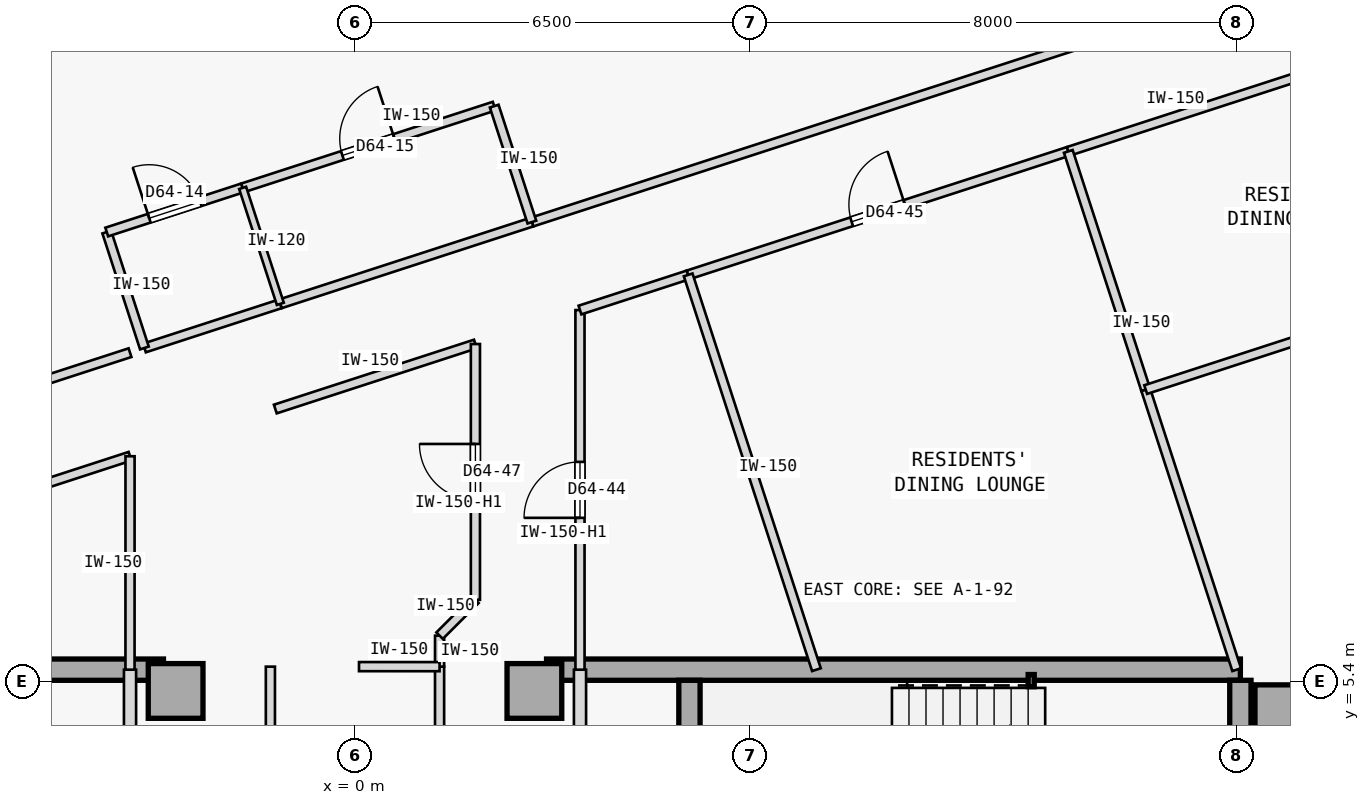
"""IFC4 building model, lengths in metres.
Left out: names, types, materials, properties, quantities, classifications, styles, units other than length and angle.
Written with IfcOpenShell. Run it as: python <this file> out.ifc"""

import sys

from ifc_helpers import new_model, si_unit, direction, frame, frame_2d, origin, origin_2d, place, context, subcontext, project, spatial, rectangle, hollow_rectangle, extrude, element, fill, save


model = new_model("IFC4")
c1 = context("Model", 3, precision=1e-05, world=origin(), true_north=direction((0.0, 1.0)))
c2 = subcontext(c1, "Body", "Model", "MODEL_VIEW")
j1 = project(units=[si_unit("LENGTHUNIT", "METRE"), si_unit("PLANEANGLEUNIT", "RADIAN")], contexts=[c1])
p1 = place(None, origin())
s1 = spatial("IfcSite", under=j1, at=p1, CompositionType="ELEMENT")
p2 = place(p1, origin())
s2 = spatial("IfcBuilding", under=s1, at=p2, CompositionType="ELEMENT")
p3 = place(p2, frame((0.0, 0.0, 241.05)))
s3 = spatial("IfcBuildingStorey", under=s2, at=p3, CompositionType="ELEMENT", Elevation=241.05)
for number, where, z_axis, x_axis in (
    (1, (-2.95, 5.25, 0.0), (0.0, 0.0, 1.0), (1.0, 0.0, 0.0)),
    (2, (15.25, 4.9, 0.0), (0.0, 0.0, 1.0), (1.0, 0.0, 0.0)),
    (3, (2.95, 5.25, 0.0), (0.0, 0.0, 1.0), (1.0, 0.0, 0.0)),
):
    element("IfcColumn", number, at=place(p3, frame(where, z_axis=z_axis, x_axis=x_axis)), inside=s3, PredefinedType="COLUMN", context=c2, shape_type="SweptSolid", body=[
        extrude(rectangle(XDim=0.9, YDim=0.9, at=origin_2d()), origin(), (0.0, 0.0, 1.0), 3.35),
    ])
for number, where, z_axis, x_axis in (
    (4, (-14.56, 5.6, 0.0), (0.0, 0.0, 1.0), (1.0, 0.0, 0.0)),
    (5, (3.15, 5.6, 0.0), (0.0, 0.0, 1.0), (1.0, 0.0, 0.0)),
):
    element("IfcWall", number, at=place(p3, frame(where, z_axis=z_axis, x_axis=x_axis)), inside=s3, PredefinedType="SHEAR", context=c2, shape_type="SweptSolid", body=[
        extrude(rectangle(XDim=11.41, YDim=0.35, at=frame_2d((5.705, 0.0))), origin(), (0.0, 0.0, 1.0), 3.125),
    ])
p4 = place(p3, frame((14.56, -5.425, 0.0), z_axis=(0.0, 0.0, 1.0), x_axis=(0.0, 1.0, 0.0)))
e6 = element("IfcWall", 6, at=p4, inside=s3, PredefinedType="SHEAR", context=c2, shape_type="SweptSolid", body=[
    extrude(rectangle(XDim=10.85, YDim=0.35, at=frame_2d((5.425, 0.0))), origin(), (0.0, 0.0, 1.0), 3.125),
])
p5 = place(p3, frame((5.5, 2.15, 0.0), z_axis=(0.0, 0.0, 1.0), x_axis=(0.0, 1.0, 0.0)))
e7 = element("IfcWall", 7, at=p5, inside=s3, PredefinedType="SHEAR", context=c2, shape_type="SweptSolid", body=[
    extrude(rectangle(XDim=3.275, YDim=0.35, at=frame_2d((1.638, 0.0))), origin(), (0.0, 0.0, 1.0), 3.125),
])
p6 = place(p3, frame((11.12, 5.42, 0.0), z_axis=(0.0, 0.0, 1.0), x_axis=(1.0, 0.0, 0.0)))
e8 = element("IfcColumn", 8, at=p6, inside=s3, PredefinedType="COLUMN", context=c2, shape_type="SweptSolid", body=[
    extrude(hollow_rectangle(XDim=0.1, YDim=0.2, WallThickness=0.008, at=origin_2d()), origin(), (0.0, 0.0, 1.0), 3.35),
])
p7 = place(p3, frame((-3.7, -1.15, 0.0), z_axis=(0.0, 0.0, 1.0), x_axis=(0.0, 1.0, 0.0)))
e9 = element("IfcWall", 9, at=p7, inside=s3, PredefinedType="STANDARD", context=c2, shape_type="SweptSolid", body=[
    extrude(rectangle(XDim=6.75, YDim=0.2, at=frame_2d((3.375, 0.0))), origin(), (0.0, 0.0, 1.0), 3.125),
])
p8 = place(p7, frame((3.6, 0.0, 0.0)))
e10 = element("IfcOpeningElement", 10, at=p8, cuts=e9, PredefinedType="OPENING", context=c2, shape_type="SweptSolid", body=[
    extrude(rectangle(XDim=0.92, YDim=2.15, at=frame_2d((0.46, 1.075))), frame((0.0, 0.11, 0.0), z_axis=(0.0, -1.0, 0.0), x_axis=(1.0, 0.0, 0.0)), (0.0, 0.0, 1.0), 0.22),
])
p9 = place(p3, frame((3.7, -1.15, 0.0), z_axis=(0.0, 0.0, 1.0), x_axis=(0.0, 1.0, 0.0)))
e11 = element("IfcWall", 11, at=p9, inside=s3, PredefinedType="STANDARD", context=c2, shape_type="SweptSolid", body=[
    extrude(rectangle(XDim=6.75, YDim=0.2, at=frame_2d((3.375, 0.0))), origin(), (0.0, 0.0, 1.0), 3.125),
])
p10 = place(p9, frame((1.1, 0.0, 0.0)))
e12 = element("IfcOpeningElement", 12, at=p10, cuts=e11, PredefinedType="OPENING", context=c2, shape_type="SweptSolid", body=[
    extrude(rectangle(XDim=0.9, YDim=2.15, at=frame_2d((0.45, 1.075))), frame((0.0, 0.11, 0.0), z_axis=(0.0, -1.0, 0.0), x_axis=(1.0, 0.0, 0.0)), (0.0, 0.0, 1.0), 0.22),
])
p11 = place(p9, frame((4.0, 0.0, 0.0)))
e13 = element("IfcOpeningElement", 13, at=p11, cuts=e11, PredefinedType="OPENING", context=c2, shape_type="SweptSolid", body=[
    extrude(rectangle(XDim=0.92, YDim=2.15, at=frame_2d((0.46, 1.075))), frame((0.0, 0.11, 0.0), z_axis=(0.0, -1.0, 0.0), x_axis=(1.0, 0.0, 0.0)), (0.0, 0.0, 1.0), 0.22),
])
p12 = place(p3, frame((-1.391, -5.65, 0.0), z_axis=(0.0, 0.0, 1.0), x_axis=(-8.6422954e-05, 0.999999996266, 0.0)))
e14 = element("IfcWall", 14, at=p12, inside=s3, PredefinedType="PARTITIONING", context=c2, shape_type="SweptSolid", body=[
    extrude(rectangle(XDim=11.3, YDim=0.15, at=frame_2d((5.65, 0.0))), origin(), (0.0, 0.0, 1.0), 3.125),
])
p13 = place(p12, frame((5.175, 0.0, 0.0)))
e15 = element("IfcOpeningElement", 15, at=p13, cuts=e14, PredefinedType="OPENING", context=c2, shape_type="SweptSolid", body=[
    extrude(rectangle(XDim=0.95, YDim=2.15, at=frame_2d((0.475, 1.075))), frame((0.0, 0.085, 0.0), z_axis=(0.0, -1.0, 0.0), x_axis=(1.0, 0.0, 0.0)), (0.0, 0.0, 1.0), 0.17),
])
p14 = place(p3, frame((1.391, -5.648, 0.0), z_axis=(0.0, 0.0, 1.0), x_axis=(-4.3218947e-05, 0.999999999066, 0.0)))
e16 = element("IfcWall", 16, at=p14, inside=s3, PredefinedType="PARTITIONING", context=c2, shape_type="SweptSolid", body=[
    extrude(rectangle(XDim=11.298, YDim=0.15, at=frame_2d((5.649, 0.0))), origin(), (0.0, 0.0, 1.0), 3.125),
])
p15 = place(p3, frame((-10.882, 8.479, 0.0), z_axis=(0.0, 0.0, 1.0), x_axis=(0.951051887333, 0.309031240494, 0.0)))
e17 = element("IfcWall", 17, at=p15, inside=s3, PredefinedType="PARTITIONING", context=c2, shape_type="SweptSolid", body=[
    extrude(rectangle(XDim=7.551, YDim=0.15, at=frame_2d((3.775, 0.0))), origin(), (0.0, 0.0, 1.0), 3.125),
])
p16 = place(p3, frame((2.909, 12.96, 0.0), z_axis=(0.0, 0.0, 1.0), x_axis=(0.951056113966, 0.309018232614, 0.0)))
e18 = element("IfcWall", 18, at=p16, inside=s3, PredefinedType="PARTITIONING", context=c2, shape_type="SweptSolid", body=[
    extrude(rectangle(XDim=21.076, YDim=0.15, at=frame_2d((10.538, 0.0))), origin(), (0.0, 0.0, 1.0), 3.125),
])
p17 = place(p16, frame((10.063, 0.0, 0.0)))
e19 = element("IfcOpeningElement", 19, at=p17, cuts=e18, PredefinedType="OPENING", context=c2, shape_type="SweptSolid", body=[
    extrude(rectangle(XDim=0.95, YDim=2.15, at=frame_2d((0.475, 1.075))), frame((0.0, 0.085, 0.0), z_axis=(0.0, -1.0, 0.0), x_axis=(1.0, 0.0, 0.0)), (0.0, 0.0, 1.0), 0.17),
])
p18 = place(p3, frame((-3.463, 10.89, 0.0), z_axis=(0.0, 0.0, 1.0), x_axis=(0.951045519245, 0.309050837767, 0.0)))
e20 = element("IfcWall", 20, at=p18, inside=s3, PredefinedType="PARTITIONING", context=c2, shape_type="SweptSolid", body=[
    extrude(rectangle(XDim=2.35, YDim=0.15, at=frame_2d((1.175, 0.0))), origin(), (0.0, 0.0, 1.0), 3.125),
])
p19 = place(p3, frame((-1.228, 11.616, 0.0), z_axis=(0.0, 0.0, 1.0), x_axis=(0.951069122051, 0.308978195154, 0.0)))
e21 = element("IfcWall", 21, at=p19, inside=s3, PredefinedType="PARTITIONING", context=c2, shape_type="SweptSolid", body=[
    extrude(rectangle(XDim=4.35, YDim=0.15, at=frame_2d((2.175, 0.0))), origin(), (0.0, 0.0, 1.0), 3.125),
])
p20 = place(p3, frame((3.7, 5.6, 0.0), z_axis=(0.0, 0.0, 1.0), x_axis=(-0.000123839008, 0.999999992332, 0.0)))
e22 = element("IfcWall", 22, at=p20, inside=s3, PredefinedType="PARTITIONING", context=c2, shape_type="SweptSolid", body=[
    extrude(rectangle(XDim=5.914, YDim=0.15, at=frame_2d((2.957, 0.0))), origin(), (0.0, 0.0, 1.0), 2.675),
])
p21 = place(p20, frame((2.497, 0.0, 0.0)))
e23 = element("IfcOpeningElement", 23, at=p21, cuts=e22, PredefinedType="OPENING", context=c2, shape_type="SweptSolid", body=[
    extrude(rectangle(XDim=0.92, YDim=2.15, at=frame_2d((0.46, 1.075))), frame((0.0, 0.085, 0.0), z_axis=(0.0, -1.0, 0.0), x_axis=(1.0, 0.0, 0.0)), (0.0, 0.0, 1.0), 0.17),
])
p22 = place(p3, frame((3.699, 11.514, 0.0), z_axis=(0.0, 0.0, 1.0), x_axis=(0.951069540665, 0.308976906612, 0.0)))
e24 = element("IfcWall", 24, at=p22, inside=s3, PredefinedType="PARTITIONING", context=c2, shape_type="SweptSolid", body=[
    extrude(rectangle(XDim=1.871, YDim=0.15, at=frame_2d((0.936, 0.0))), origin(), (0.0, 0.0, 1.0), 3.125),
])
p23 = place(p3, frame((5.479, 12.092, 0.0), z_axis=(0.0, 0.0, 1.0), x_axis=(0.951051809397, 0.309031480343, 0.0)))
e25 = element("IfcWall", 25, at=p23, inside=s3, PredefinedType="PARTITIONING", context=c2, shape_type="SweptSolid", body=[
    extrude(rectangle(XDim=6.573, YDim=0.15, at=frame_2d((3.287, 0.0))), origin(), (0.0, 0.0, 1.0), 3.125),
])
p24 = place(p23, frame((2.826, 0.0, 0.0)))
e26 = element("IfcOpeningElement", 26, at=p24, cuts=e25, PredefinedType="OPENING", context=c2, shape_type="SweptSolid", body=[
    extrude(rectangle(XDim=0.92, YDim=2.15, at=frame_2d((0.46, 1.075))), frame((0.0, 0.085, 0.0), z_axis=(0.0, -1.0, 0.0), x_axis=(1.0, 0.0, 0.0)), (0.0, 0.0, 1.0), 0.17),
])
p25 = place(p3, frame((-1.311, 9.886, 0.0), z_axis=(0.0, 0.0, 1.0), x_axis=(0.951068803905, 0.308979174442, 0.0)))
e27 = element("IfcWall", 27, at=p25, inside=s3, PredefinedType="PARTITIONING", context=c2, shape_type="SweptSolid", body=[
    extrude(rectangle(XDim=3.46, YDim=0.15, at=frame_2d((1.73, 0.0))), origin(), (0.0, 0.0, 1.0), 3.125),
])
p26 = place(p3, frame((1.391, 5.649, 0.0), z_axis=(0.0, 0.0, 1.0), x_axis=(0.000957395444, 0.999999541697, 0.0)))
e28 = element("IfcWall", 28, at=p26, inside=s3, PredefinedType="PARTITIONING", context=c2, shape_type="SweptSolid", body=[
    extrude(rectangle(XDim=0.51, YDim=0.15, at=frame_2d((0.255, 0.0))), origin(), (0.0, 0.0, 1.0), 3.125),
])
p27 = place(p3, frame((1.391, 6.159, 0.0), z_axis=(0.0, 0.0, 1.0), x_axis=(0.707106781187, 0.707106781187, 0.0)))
e29 = element("IfcWall", 29, at=p27, inside=s3, PredefinedType="PARTITIONING", context=c2, shape_type="SweptSolid", body=[
    extrude(rectangle(XDim=0.833, YDim=0.15, at=frame_2d((0.417, 0.0))), origin(), (0.0, 0.0, 1.0), 3.125),
])
p28 = place(p3, frame((1.98, 6.748, 0.0), z_axis=(0.0, 0.0, 1.0), x_axis=(0.0, 1.0, 0.0)))
e30 = element("IfcWall", 30, at=p28, inside=s3, PredefinedType="PARTITIONING", context=c2, shape_type="SweptSolid", body=[
    extrude(rectangle(XDim=4.207, YDim=0.15, at=frame_2d((2.104, 0.0))), origin(), (0.0, 0.0, 1.0), 2.675),
])
p29 = place(p28, frame((1.643, 0.0, 0.0)))
e31 = element("IfcOpeningElement", 31, at=p29, cuts=e30, PredefinedType="OPENING", context=c2, shape_type="SweptSolid", body=[
    extrude(rectangle(XDim=0.92, YDim=2.15, at=frame_2d((0.46, 1.075))), frame((0.0, 0.085, 0.0), z_axis=(0.0, -1.0, 0.0), x_axis=(1.0, 0.0, 0.0)), (0.0, 0.0, 1.0), 0.17),
])
p30 = place(p3, frame((-10.612, 6.864, 0.0), z_axis=(0.0, 0.0, 1.0), x_axis=(0.951060972078, 0.309003280548, 0.0)))
e32 = element("IfcWall", 32, at=p30, inside=s3, PredefinedType="PARTITIONING", context=c2, shape_type="SweptSolid", body=[
    extrude(rectangle(XDim=7.268, YDim=0.15, at=frame_2d((3.634, 0.0))), origin(), (0.0, 0.0, 1.0), 3.125),
])
p31 = place(p30, frame((3.174, 0.0, 0.0)))
e33 = element("IfcOpeningElement", 33, at=p31, cuts=e32, PredefinedType="OPENING", context=c2, shape_type="SweptSolid", body=[
    extrude(rectangle(XDim=0.92, YDim=2.15, at=frame_2d((0.46, 1.075))), frame((0.0, 0.085, 0.0), z_axis=(0.0, -1.0, 0.0), x_axis=(1.0, 0.0, 0.0)), (0.0, 0.0, 1.0), 0.17),
])
p32 = place(p3, frame((-3.7, 5.6, 0.0), z_axis=(0.0, 0.0, 1.0), x_axis=(0.000139120755, 0.999999990323, 0.0)))
e34 = element("IfcWall", 34, at=p32, inside=s3, PredefinedType="PARTITIONING", context=c2, shape_type="SweptSolid", body=[
    extrude(rectangle(XDim=3.51, YDim=0.15, at=frame_2d((1.755, 0.0))), origin(), (0.0, 0.0, 1.0), 3.125),
])
p33 = place(p3, frame((11.73, 14.123, 0.0), z_axis=(0.0, 0.0, 1.0), x_axis=(0.951060263663, 0.309005460926, 0.0)))
e35 = element("IfcWall", 35, at=p33, inside=s3, PredefinedType="PARTITIONING", context=c2, shape_type="SweptSolid", body=[
    extrude(rectangle(XDim=12.327, YDim=0.15, at=frame_2d((6.164, 0.0))), origin(), (0.0, 0.0, 1.0), 3.125),
])
p34 = place(p33, frame((5.704, 0.0, 0.0)))
e36 = element("IfcOpeningElement", 36, at=p34, cuts=e35, PredefinedType="OPENING", context=c2, shape_type="SweptSolid", body=[
    extrude(rectangle(XDim=0.92, YDim=2.15, at=frame_2d((0.46, 1.075))), frame((0.0, 0.085, 0.0), z_axis=(0.0, -1.0, 0.0), x_axis=(1.0, 0.0, 0.0)), (0.0, 0.0, 1.0), 0.17),
])
p35 = place(p3, frame((0.066, 5.65, 0.0), z_axis=(0.0, 0.0, 1.0), x_axis=(0.999999932094, -0.000368527707, 0.0)))
e37 = element("IfcWall", 37, at=p35, inside=s3, PredefinedType="PARTITIONING", context=c2, shape_type="SweptSolid", body=[
    extrude(rectangle(XDim=1.325, YDim=0.15, at=frame_2d((0.663, 0.0))), origin(), (0.0, 0.0, 1.0), 3.125),
])
p36 = place(p3, frame((-3.463, 10.89, 0.0), z_axis=(0.0, 0.0, 1.0), x_axis=(-0.308912611775, 0.951090425925, 0.0)))
e38 = element("IfcWall", 38, at=p36, inside=s3, PredefinedType="PARTITIONING", context=c2, shape_type="SweptSolid", body=[
    extrude(rectangle(XDim=2.005, YDim=0.15, at=frame_2d((1.002, 0.0))), origin(), (0.0, 0.0, 1.0), 3.125),
])
p37 = place(p3, frame((-4.083, 12.797, 0.0), z_axis=(0.0, 0.0, 1.0), x_axis=(0.951066131077, 0.308987401554, 0.0)))
e39 = element("IfcWall", 39, at=p37, inside=s3, PredefinedType="PARTITIONING", context=c2, shape_type="SweptSolid", body=[
    extrude(rectangle(XDim=2.35, YDim=0.15, at=frame_2d((1.175, 0.0))), origin(), (0.0, 0.0, 1.0), 3.125),
])
p38 = place(p37, frame((0.735, 0.0, 0.0)))
e40 = element("IfcOpeningElement", 40, at=p38, cuts=e39, PredefinedType="OPENING", context=c2, shape_type="SweptSolid", body=[
    extrude(rectangle(XDim=0.88, YDim=2.15, at=frame_2d((0.44, 1.075))), frame((0.0, 0.085, 0.0), z_axis=(0.0, -1.0, 0.0), x_axis=(1.0, 0.0, 0.0)), (0.0, 0.0, 1.0), 0.17),
])
p39 = place(p3, frame((-1.848, 13.523, 0.0), z_axis=(0.0, 0.0, 1.0), x_axis=(0.951057987102, 0.309012467661, 0.0)))
e41 = element("IfcWall", 41, at=p39, inside=s3, PredefinedType="PARTITIONING", context=c2, shape_type="SweptSolid", body=[
    extrude(rectangle(XDim=4.35, YDim=0.15, at=frame_2d((2.175, 0.0))), origin(), (0.0, 0.0, 1.0), 3.125),
])
p40 = place(p39, frame((1.725, 0.0, 0.0)))
e42 = element("IfcOpeningElement", 42, at=p40, cuts=e41, PredefinedType="OPENING", context=c2, shape_type="SweptSolid", body=[
    extrude(rectangle(XDim=0.9, YDim=2.15, at=frame_2d((0.45, 1.075))), frame((0.0, 0.085, 0.0), z_axis=(0.0, -1.0, 0.0), x_axis=(1.0, 0.0, 0.0)), (0.0, 0.0, 1.0), 0.17),
])
p41 = place(p3, frame((2.909, 12.96, 0.0), z_axis=(0.0, 0.0, 1.0), x_axis=(-0.308912611775, 0.951090425925, 0.0)))
e43 = element("IfcWall", 43, at=p41, inside=s3, PredefinedType="PARTITIONING", context=c2, shape_type="SweptSolid", body=[
    extrude(rectangle(XDim=2.005, YDim=0.15, at=frame_2d((1.002, 0.0))), origin(), (0.0, 0.0, 1.0), 3.125),
])
p42 = place(p3, frame((-1.228, 11.616, 0.0), z_axis=(0.0, 0.0, 1.0), x_axis=(-0.309058537449, 0.951043017129, 0.0)))
e44 = element("IfcWall", 44, at=p42, inside=s3, PredefinedType="PARTITIONING", context=c2, shape_type="SweptSolid", body=[
    extrude(rectangle(XDim=2.005, YDim=0.12, at=frame_2d((1.002, 0.0))), origin(), (0.0, 0.0, 1.0), 3.125),
])
p43 = place(p3, frame((7.588, 5.6, 0.0), z_axis=(0.0, 0.0, 1.0), x_axis=(-0.309018946982, 0.951055881852, 0.0)))
e45 = element("IfcWall", 45, at=p43, inside=s3, PredefinedType="PARTITIONING", context=c2, shape_type="SweptSolid", body=[
    extrude(rectangle(XDim=6.826, YDim=0.15, at=frame_2d((3.413, 0.0))), origin(), (0.0, 0.0, 1.0), 3.125),
])
p44 = place(p3, frame((14.5, 5.6, 0.0), z_axis=(0.0, 0.0, 1.0), x_axis=(-0.308974360462, 0.951070367837, 0.0)))
e46 = element("IfcWall", 46, at=p44, inside=s3, PredefinedType="PARTITIONING", context=c2, shape_type="SweptSolid", body=[
    extrude(rectangle(XDim=4.843, YDim=0.15, at=frame_2d((2.421, 0.0))), origin(), (0.0, 0.0, 1.0), 3.125),
])
p45 = place(p3, frame((13.003, 10.206, 0.0), z_axis=(0.0, 0.0, 1.0), x_axis=(-0.309035144366, 0.951050618814, 0.0)))
e47 = element("IfcWall", 47, at=p45, inside=s3, PredefinedType="PARTITIONING", context=c2, shape_type="SweptSolid", body=[
    extrude(rectangle(XDim=4.119, YDim=0.15, at=frame_2d((2.06, 0.0))), origin(), (0.0, 0.0, 1.0), 3.125),
])
p46 = place(p3, frame((15.064, 3.863, 0.0), z_axis=(0.0, 0.0, 1.0), x_axis=(0.951061448945, 0.309001812827, 0.0)))
e48 = element("IfcWall", 48, at=p46, inside=s3, PredefinedType="PARTITIONING", context=c2, shape_type="SweptSolid", body=[
    extrude(rectangle(XDim=10.352, YDim=0.15, at=frame_2d((5.176, 0.0))), origin(), (0.0, 0.0, 1.0), 3.125),
])
p47 = place(p46, frame((4.716, 0.0, 0.0)))
e49 = element("IfcOpeningElement", 49, at=p47, cuts=e48, PredefinedType="OPENING", context=c2, shape_type="SweptSolid", body=[
    extrude(rectangle(XDim=0.92, YDim=2.15, at=frame_2d((0.46, 1.075))), frame((0.0, 0.085, 0.0), z_axis=(0.0, -1.0, 0.0), x_axis=(1.0, 0.0, 0.0)), (0.0, 0.0, 1.0), 0.17),
])
p48 = place(p3, frame((13.003, 10.206, 0.0), z_axis=(0.0, 0.0, 1.0), x_axis=(0.951060263663, 0.309005460926, 0.0)))
e50 = element("IfcWall", 50, at=p48, inside=s3, PredefinedType="PARTITIONING", context=c2, shape_type="SweptSolid", body=[
    extrude(rectangle(XDim=12.327, YDim=0.15, at=frame_2d((6.164, 0.0))), origin(), (0.0, 0.0, 1.0), 2.675),
])
p49 = place(p38, origin())
e51 = element("IfcDoor", 51, at=p49, inside=s3, OperationType="SINGLE_SWING_LEFT", PredefinedType="DOOR", context=c2, shape_type="SweptSolid", body=[
    extrude(rectangle(XDim=0.88, YDim=2.15, at=frame_2d((0.44, 1.075))), frame((0.0, 0.025, 0.0), z_axis=(0.0, -1.0, 0.0), x_axis=(1.0, 0.0, 0.0)), (0.0, 0.0, 1.0), 0.05),
])
fill(e40, e51)
p50 = place(p40, origin())
e52 = element("IfcDoor", 52, at=p50, inside=s3, OperationType="SINGLE_SWING_RIGHT", PredefinedType="DOOR", context=c2, shape_type="SweptSolid", body=[
    extrude(rectangle(XDim=0.9, YDim=2.15, at=frame_2d((0.45, 1.075))), frame((0.0, 0.025, 0.0), z_axis=(0.0, -1.0, 0.0), x_axis=(1.0, 0.0, 0.0)), (0.0, 0.0, 1.0), 0.05),
])
fill(e42, e52)
p51 = place(p21, origin())
e53 = element("IfcDoor", 53, at=p51, inside=s3, OperationType="SINGLE_SWING_LEFT", PredefinedType="DOOR", context=c2, shape_type="SweptSolid", body=[
    extrude(rectangle(XDim=0.92, YDim=2.15, at=frame_2d((0.46, 1.075))), frame((0.0, 0.025, 0.0), z_axis=(0.0, -1.0, 0.0), x_axis=(1.0, 0.0, 0.0)), (0.0, 0.0, 1.0), 0.05),
])
fill(e23, e53)
p52 = place(p24, origin())
e54 = element("IfcDoor", 54, at=p52, inside=s3, OperationType="SINGLE_SWING_RIGHT", PredefinedType="DOOR", context=c2, shape_type="SweptSolid", body=[
    extrude(rectangle(XDim=0.92, YDim=2.15, at=frame_2d((0.46, 1.075))), frame((0.0, 0.025, 0.0), z_axis=(0.0, -1.0, 0.0), x_axis=(1.0, 0.0, 0.0)), (0.0, 0.0, 1.0), 0.05),
])
fill(e26, e54)
p53 = place(p29, origin())
e55 = element("IfcDoor", 55, at=p53, inside=s3, OperationType="SINGLE_SWING_RIGHT", PredefinedType="DOOR", context=c2, shape_type="SweptSolid", body=[
    extrude(rectangle(XDim=0.92, YDim=2.15, at=frame_2d((0.46, 1.075))), frame((0.0, 0.025, 0.0), z_axis=(0.0, -1.0, 0.0), x_axis=(1.0, 0.0, 0.0)), (0.0, 0.0, 1.0), 0.05),
])
fill(e31, e55)
save(model, sys.argv[1])
